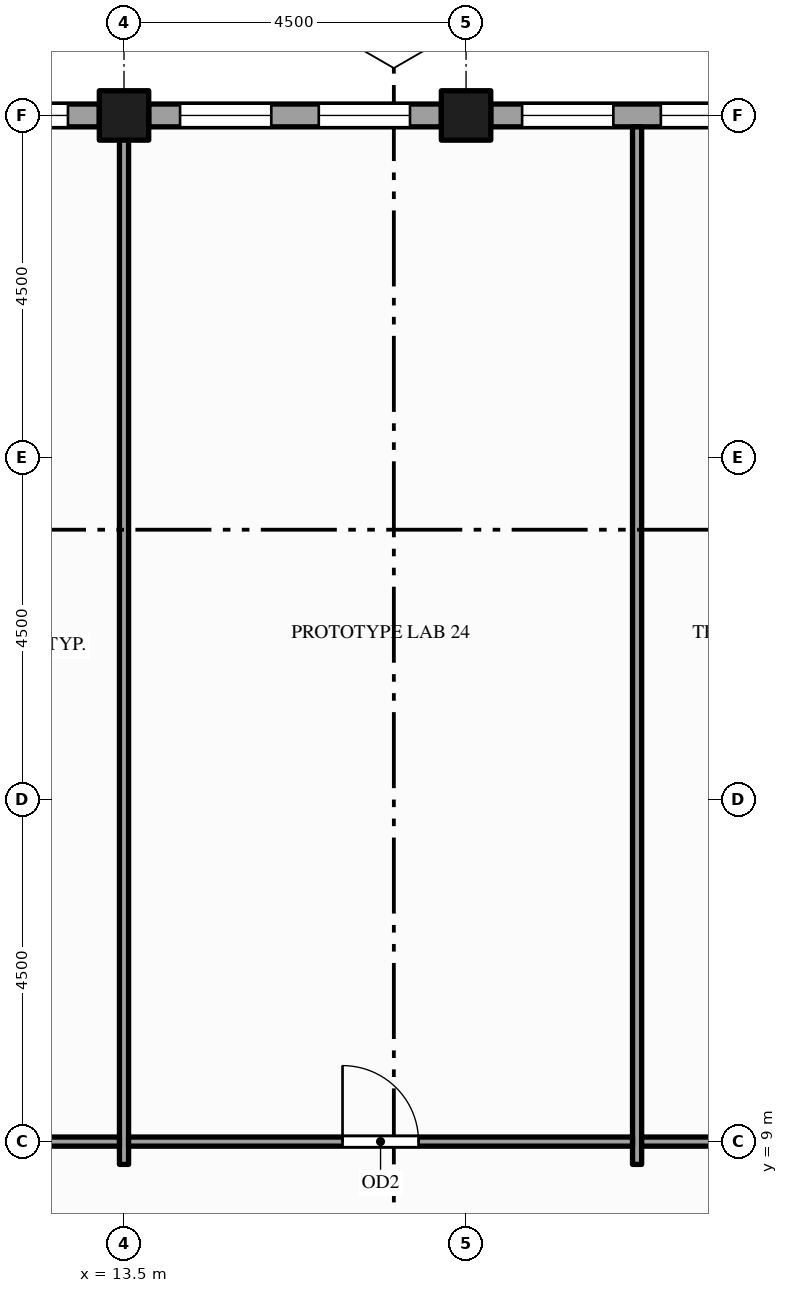
"""IFC4 building model, lengths in metres.
Left out: names, types, materials, properties, quantities, classifications, styles, units other than length and angle.
Written with IfcOpenShell. Run it as: python <this file> out.ifc"""

import sys

from ifc_helpers import new_model, si_unit, direction, frame, frame_2d, origin, origin_2d, place, context, subcontext, project, spatial, rectangle, hollow_rectangle, extrude, element, fill, save


model = new_model("IFC4")
c1 = context("Model", 3, precision=1e-05, world=origin(), true_north=direction((0.0, 1.0)))
c2 = subcontext(c1, "Body", "Model", "MODEL_VIEW")
j1 = project(units=[si_unit("LENGTHUNIT", "METRE"), si_unit("PLANEANGLEUNIT", "RADIAN")], contexts=[c1])
p1 = place(None, origin())
s1 = spatial("IfcSite", under=j1, at=p1, CompositionType="ELEMENT")
p2 = place(p1, origin())
s2 = spatial("IfcBuilding", under=s1, at=p2, CompositionType="ELEMENT")
p3 = place(p2, frame((0.0, 0.0, 269.0)))
s3 = spatial("IfcBuildingStorey", under=s2, at=p3, CompositionType="ELEMENT", Elevation=269.0)
for number, where, z_axis, x_axis in (
    (1, (13.5, 22.5, -0.15), (0.0, 0.0, 1.0), (1.0, 0.0, 0.0)),
    (2, (18.0, 22.5, -0.15), (0.0, 0.0, 1.0), (1.0, 0.0, 0.0)),
):
    element("IfcColumn", number, at=place(p3, frame(where, z_axis=z_axis, x_axis=x_axis)), inside=s3, PredefinedType="COLUMN", context=c2, shape_type="SweptSolid", body=[
        extrude(hollow_rectangle(XDim=0.65, YDim=0.65, WallThickness=0.032, at=origin_2d()), origin(), (0.0, 0.0, 1.0), 4.0),
    ])
p4 = place(p3, frame((22.175, 22.5, 0.0), z_axis=(0.0, 0.0, 1.0), x_axis=(-1.0, 0.0, 0.0)))
e3 = element("IfcWall", 3, at=p4, inside=s3, PredefinedType="STANDARD", context=c2, shape_type="SweptSolid", body=[
    extrude(rectangle(XDim=3.85, YDim=0.3, at=frame_2d((1.925, 0.0))), origin(), (0.0, 0.0, 1.0), 2.87),
])
p5 = place(p4, frame((0.413, 0.0, 0.9)))
e4 = element("IfcOpeningElement", 4, at=p5, cuts=e3, PredefinedType="OPENING", context=c2, shape_type="SweptSolid", body=[
    extrude(rectangle(XDim=1.2, YDim=1.75, at=frame_2d((0.6, 0.875))), frame((0.0, 0.16, 0.0), z_axis=(0.0, -1.0, 0.0), x_axis=(1.0, 0.0, 0.0)), (0.0, 0.0, 1.0), 0.32),
])
p6 = place(p4, frame((2.238, 0.0, 0.9)))
e5 = element("IfcOpeningElement", 5, at=p6, cuts=e3, PredefinedType="OPENING", context=c2, shape_type="SweptSolid", body=[
    extrude(rectangle(XDim=1.2, YDim=1.75, at=frame_2d((0.6, 0.875))), frame((0.0, 0.16, 0.0), z_axis=(0.0, -1.0, 0.0), x_axis=(1.0, 0.0, 0.0)), (0.0, 0.0, 1.0), 0.32),
])
p7 = place(p3, frame((17.675, 22.5, 0.0), z_axis=(0.0, 0.0, 1.0), x_axis=(-1.0, 0.0, 0.0)))
e6 = element("IfcWall", 6, at=p7, inside=s3, PredefinedType="STANDARD", context=c2, shape_type="SweptSolid", body=[
    extrude(rectangle(XDim=3.85, YDim=0.3, at=frame_2d((1.925, 0.0))), origin(), (0.0, 0.0, 1.0), 2.87),
])
p8 = place(p7, frame((0.413, 0.0, 0.9)))
e7 = element("IfcOpeningElement", 7, at=p8, cuts=e6, PredefinedType="OPENING", context=c2, shape_type="SweptSolid", body=[
    extrude(rectangle(XDim=1.2, YDim=1.75, at=frame_2d((0.6, 0.875))), frame((0.0, 0.16, 0.0), z_axis=(0.0, -1.0, 0.0), x_axis=(1.0, 0.0, 0.0)), (0.0, 0.0, 1.0), 0.32),
])
p9 = place(p7, frame((2.238, 0.0, 0.9)))
e8 = element("IfcOpeningElement", 8, at=p9, cuts=e6, PredefinedType="OPENING", context=c2, shape_type="SweptSolid", body=[
    extrude(rectangle(XDim=1.2, YDim=1.75, at=frame_2d((0.6, 0.875))), frame((0.0, 0.16, 0.0), z_axis=(0.0, -1.0, 0.0), x_axis=(1.0, 0.0, 0.0)), (0.0, 0.0, 1.0), 0.32),
])
p10 = place(p3, frame((13.175, 22.5, 0.0), z_axis=(0.0, 0.0, 1.0), x_axis=(-1.0, 0.0, 0.0)))
e9 = element("IfcWall", 9, at=p10, inside=s3, PredefinedType="STANDARD", context=c2, shape_type="SweptSolid", body=[
    extrude(rectangle(XDim=3.85, YDim=0.3, at=frame_2d((1.925, 0.0))), origin(), (0.0, 0.0, 1.0), 2.87),
])
p11 = place(p10, frame((0.413, 0.0, 0.9)))
e10 = element("IfcOpeningElement", 10, at=p11, cuts=e9, PredefinedType="OPENING", context=c2, shape_type="SweptSolid", body=[
    extrude(rectangle(XDim=1.2, YDim=1.75, at=frame_2d((0.6, 0.875))), frame((0.0, 0.16, 0.0), z_axis=(0.0, -1.0, 0.0), x_axis=(1.0, 0.0, 0.0)), (0.0, 0.0, 1.0), 0.32),
])
p12 = place(p10, frame((2.238, 0.0, 0.9)))
e11 = element("IfcOpeningElement", 11, at=p12, cuts=e9, PredefinedType="OPENING", context=c2, shape_type="SweptSolid", body=[
    extrude(rectangle(XDim=1.2, YDim=1.75, at=frame_2d((0.6, 0.875))), frame((0.0, 0.16, 0.0), z_axis=(0.0, -1.0, 0.0), x_axis=(1.0, 0.0, 0.0)), (0.0, 0.0, 1.0), 0.32),
])
for number, where, z_axis, x_axis in (
    (12, (13.5, 8.7, 0.0), (0.0, 0.0, 1.0), (0.0, 1.0, 0.0)),
    (13, (20.25, 8.7, 0.0), (0.0, 0.0, 1.0), (0.0, 1.0, 0.0)),
):
    element("IfcWall", number, at=place(p3, frame(where, z_axis=z_axis, x_axis=x_axis)), inside=s3, PredefinedType="PARTITIONING", context=c2, shape_type="SweptSolid", body=[
        extrude(rectangle(XDim=13.65, YDim=0.12, at=frame_2d((6.825, 0.0))), origin(), (0.0, 0.0, 1.0), 2.87),
    ])
p13 = place(p3, frame((0.15, 9.0, 0.0), z_axis=(0.0, 0.0, 1.0), x_axis=(1.0, 0.0, 0.0)))
e14 = element("IfcWall", 14, at=p13, inside=s3, PredefinedType="PARTITIONING", context=c2, shape_type="SweptSolid", body=[
    extrude(rectangle(XDim=13.29, YDim=0.12, at=frame_2d((6.645, 0.0))), origin(), (0.0, 0.0, 1.0), 2.87),
])
p14 = place(p13, frame((5.755, 0.0, 0.0)))
e15 = element("IfcOpeningElement", 15, at=p14, cuts=e14, PredefinedType="OPENING", context=c2, shape_type="SweptSolid", body=[
    extrude(rectangle(XDim=1.8, YDim=2.1, at=frame_2d((0.9, 1.05))), frame((0.0, 0.07, 0.0), z_axis=(0.0, -1.0, 0.0), x_axis=(1.0, 0.0, 0.0)), (0.0, 0.0, 1.0), 0.14),
])
p15 = place(p3, frame((13.56, 9.0, 0.0), z_axis=(0.0, 0.0, 1.0), x_axis=(1.0, 0.0, 0.0)))
e16 = element("IfcWall", 16, at=p15, inside=s3, PredefinedType="PARTITIONING", context=c2, shape_type="SweptSolid", body=[
    extrude(rectangle(XDim=6.63, YDim=0.12, at=frame_2d((3.315, 0.0))), origin(), (0.0, 0.0, 1.0), 2.87),
])
p16 = place(p15, frame((2.815, 0.0, 0.0)))
e17 = element("IfcOpeningElement", 17, at=p16, cuts=e16, PredefinedType="OPENING", context=c2, shape_type="SweptSolid", body=[
    extrude(rectangle(XDim=1.0, YDim=2.1, at=frame_2d((0.5, 1.05))), frame((0.0, 0.07, 0.0), z_axis=(0.0, -1.0, 0.0), x_axis=(1.0, 0.0, 0.0)), (0.0, 0.0, 1.0), 0.14),
])
p17 = place(p3, frame((20.31, 9.0, 0.0), z_axis=(0.0, 0.0, 1.0), x_axis=(1.0, 0.0, 0.0)))
e18 = element("IfcWall", 18, at=p17, inside=s3, PredefinedType="PARTITIONING", context=c2, shape_type="SweptSolid", body=[
    extrude(rectangle(XDim=4.38, YDim=0.12, at=frame_2d((2.19, 0.0))), origin(), (0.0, 0.0, 1.0), 2.87),
])
p18 = place(p17, frame((1.69, 0.0, 0.0)))
e19 = element("IfcOpeningElement", 19, at=p18, cuts=e18, PredefinedType="OPENING", context=c2, shape_type="SweptSolid", body=[
    extrude(rectangle(XDim=1.0, YDim=2.1, at=frame_2d((0.5, 1.05))), frame((0.0, 0.07, 0.0), z_axis=(0.0, -1.0, 0.0), x_axis=(1.0, 0.0, 0.0)), (0.0, 0.0, 1.0), 0.14),
])
p19 = place(p5, origin())
e20 = element("IfcWindow", 20, at=p19, inside=s3, PartitioningType="SINGLE_PANEL", PredefinedType="WINDOW", context=c2, shape_type="SweptSolid", body=[
    extrude(rectangle(XDim=1.2, YDim=1.75, at=frame_2d((0.6, 0.875))), frame((0.0, 0.03, 0.0), z_axis=(0.0, -1.0, 0.0), x_axis=(1.0, 0.0, 0.0)), (0.0, 0.0, 1.0), 0.06),
])
fill(e4, e20)
p20 = place(p6, origin())
e21 = element("IfcWindow", 21, at=p20, inside=s3, PartitioningType="SINGLE_PANEL", PredefinedType="WINDOW", context=c2, shape_type="SweptSolid", body=[
    extrude(rectangle(XDim=1.2, YDim=1.75, at=frame_2d((0.6, 0.875))), frame((0.0, 0.03, 0.0), z_axis=(0.0, -1.0, 0.0), x_axis=(1.0, 0.0, 0.0)), (0.0, 0.0, 1.0), 0.06),
])
fill(e5, e21)
p21 = place(p8, origin())
e22 = element("IfcWindow", 22, at=p21, inside=s3, PartitioningType="SINGLE_PANEL", PredefinedType="WINDOW", context=c2, shape_type="SweptSolid", body=[
    extrude(rectangle(XDim=1.2, YDim=1.75, at=frame_2d((0.6, 0.875))), frame((0.0, 0.03, 0.0), z_axis=(0.0, -1.0, 0.0), x_axis=(1.0, 0.0, 0.0)), (0.0, 0.0, 1.0), 0.06),
])
fill(e7, e22)
p22 = place(p9, origin())
e23 = element("IfcWindow", 23, at=p22, inside=s3, PartitioningType="SINGLE_PANEL", PredefinedType="WINDOW", context=c2, shape_type="SweptSolid", body=[
    extrude(rectangle(XDim=1.2, YDim=1.75, at=frame_2d((0.6, 0.875))), frame((0.0, 0.03, 0.0), z_axis=(0.0, -1.0, 0.0), x_axis=(1.0, 0.0, 0.0)), (0.0, 0.0, 1.0), 0.06),
])
fill(e8, e23)
p23 = place(p11, origin())
e24 = element("IfcWindow", 24, at=p23, inside=s3, PartitioningType="SINGLE_PANEL", PredefinedType="WINDOW", context=c2, shape_type="SweptSolid", body=[
    extrude(rectangle(XDim=1.2, YDim=1.75, at=frame_2d((0.6, 0.875))), frame((0.0, 0.03, 0.0), z_axis=(0.0, -1.0, 0.0), x_axis=(1.0, 0.0, 0.0)), (0.0, 0.0, 1.0), 0.06),
])
fill(e10, e24)
p24 = place(p16, origin())
e25 = element("IfcDoor", 25, at=p24, inside=s3, OperationType="SINGLE_SWING_LEFT", PredefinedType="DOOR", context=c2, shape_type="SweptSolid", body=[
    extrude(rectangle(XDim=1.0, YDim=2.1, at=frame_2d((0.5, 1.05))), frame((0.0, 0.025, 0.0), z_axis=(0.0, -1.0, 0.0), x_axis=(1.0, 0.0, 0.0)), (0.0, 0.0, 1.0), 0.05),
])
fill(e17, e25)
save(model, sys.argv[1])
